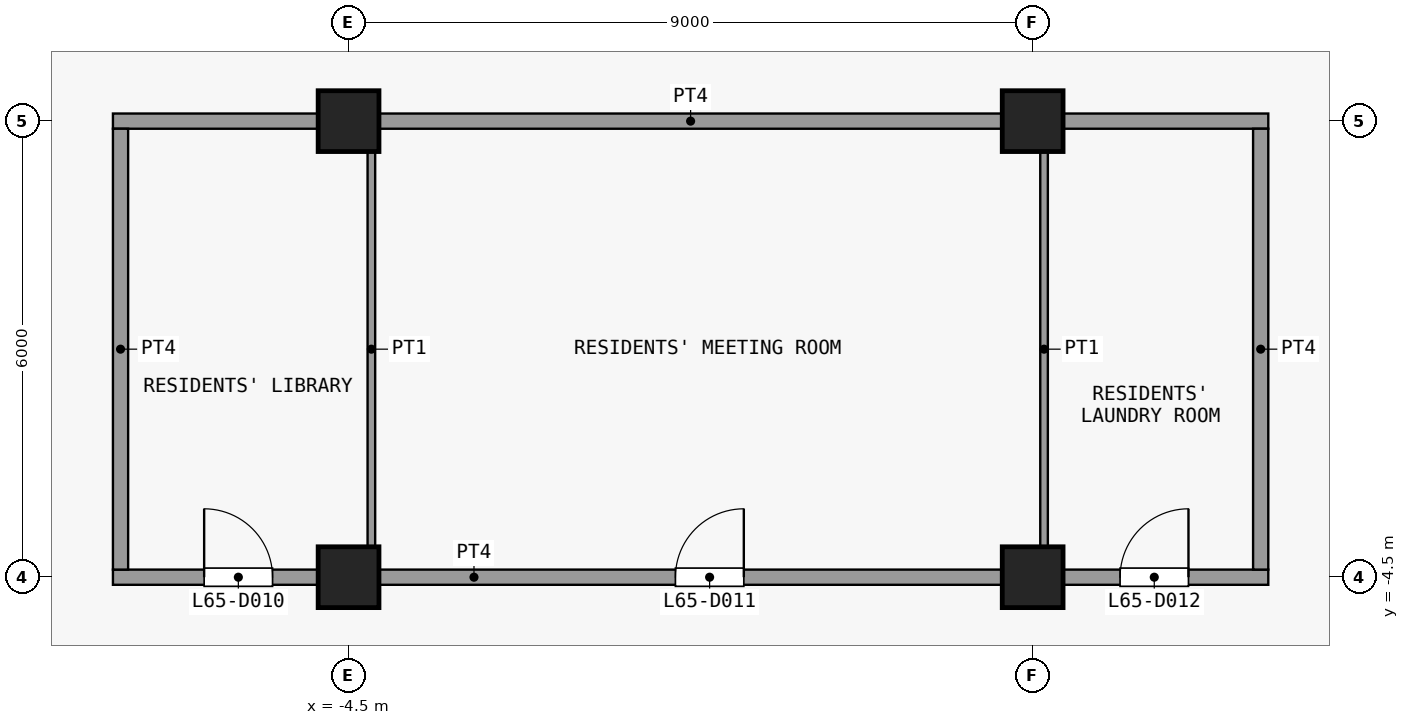
"""IFC4 building model, lengths in metres.
Left out: names, types, materials, properties, quantities, classifications, styles, units other than length and angle.
Written with IfcOpenShell. Run it as: python <this file> out.ifc"""

import sys

from ifc_helpers import new_model, si_unit, direction, frame, frame_2d, origin, origin_2d, place, context, subcontext, project, spatial, rectangle, extrude, element, fill, save


model = new_model("IFC4")
c1 = context("Model", 3, precision=1e-05, world=origin(), true_north=direction((0.0, 1.0)))
c2 = subcontext(c1, "Body", "Model", "MODEL_VIEW")
j1 = project(units=[si_unit("LENGTHUNIT", "METRE"), si_unit("PLANEANGLEUNIT", "RADIAN")], contexts=[c1])
p1 = place(None, origin())
s1 = spatial("IfcSite", under=j1, at=p1, CompositionType="ELEMENT")
p2 = place(p1, origin())
s2 = spatial("IfcBuilding", under=s1, at=p2, CompositionType="ELEMENT")
p3 = place(p2, frame((0.0, 0.0, 259.1)))
s3 = spatial("IfcBuildingStorey", under=s2, at=p3, CompositionType="ELEMENT", Elevation=259.1)
for number, where, z_axis, x_axis in (
    (1, (-4.5, -4.5, 0.0), (0.0, 0.0, 1.0), (1.0, 0.0, 0.0)),
    (2, (-4.5, 1.5, 0.0), (0.0, 0.0, 1.0), (1.0, 0.0, 0.0)),
    (3, (4.5, -4.5, 0.0), (0.0, 0.0, 1.0), (1.0, 0.0, 0.0)),
    (4, (4.5, 1.5, 0.0), (0.0, 0.0, 1.0), (1.0, 0.0, 0.0)),
):
    element("IfcColumn", number, at=place(p3, frame(where, z_axis=z_axis, x_axis=x_axis)), inside=s3, PredefinedType="COLUMN", context=c2, shape_type="SweptSolid", body=[
        extrude(rectangle(XDim=0.8, YDim=0.8, at=origin_2d()), origin(), (0.0, 0.0, 1.0), 3.6),
    ])
p4 = place(p3, frame((-7.6, -4.5, 0.0), z_axis=(0.0, 0.0, 1.0), x_axis=(1.0, 0.0, 0.0)))
e5 = element("IfcWall", 5, at=p4, inside=s3, PredefinedType="PARTITIONING", context=c2, shape_type="SweptSolid", body=[
    extrude(rectangle(XDim=15.2, YDim=0.2, at=frame_2d((7.6, 0.0))), origin(), (0.0, 0.0, 1.0), 3.3),
])
p5 = place(p4, frame((1.2, 0.0, 0.0)))
e6 = element("IfcOpeningElement", 6, at=p5, cuts=e5, PredefinedType="OPENING", context=c2, shape_type="SweptSolid", body=[
    extrude(rectangle(XDim=0.9, YDim=2.1, at=frame_2d((0.45, 1.05))), frame((0.0, 0.11, 0.0), z_axis=(0.0, -1.0, 0.0), x_axis=(1.0, 0.0, 0.0)), (0.0, 0.0, 1.0), 0.22),
])
p6 = place(p4, frame((7.4, 0.0, 0.0)))
e7 = element("IfcOpeningElement", 7, at=p6, cuts=e5, PredefinedType="OPENING", context=c2, shape_type="SweptSolid", body=[
    extrude(rectangle(XDim=0.9, YDim=2.1, at=frame_2d((0.45, 1.05))), frame((0.0, 0.11, 0.0), z_axis=(0.0, -1.0, 0.0), x_axis=(1.0, 0.0, 0.0)), (0.0, 0.0, 1.0), 0.22),
])
p7 = place(p4, frame((13.25, 0.0, 0.0)))
e8 = element("IfcOpeningElement", 8, at=p7, cuts=e5, PredefinedType="OPENING", context=c2, shape_type="SweptSolid", body=[
    extrude(rectangle(XDim=0.9, YDim=2.1, at=frame_2d((0.45, 1.05))), frame((0.0, 0.11, 0.0), z_axis=(0.0, -1.0, 0.0), x_axis=(1.0, 0.0, 0.0)), (0.0, 0.0, 1.0), 0.22),
])
p8 = place(p3, frame((-7.6, 1.5, 0.0), z_axis=(0.0, 0.0, 1.0), x_axis=(1.0, 0.0, 0.0)))
e9 = element("IfcWall", 9, at=p8, inside=s3, PredefinedType="PARTITIONING", context=c2, shape_type="SweptSolid", body=[
    extrude(rectangle(XDim=15.2, YDim=0.2, at=frame_2d((7.6, 0.0))), origin(), (0.0, 0.0, 1.0), 3.3),
])
p9 = place(p3, frame((-7.5, -4.4, 0.0), z_axis=(0.0, 0.0, 1.0), x_axis=(0.0, 1.0, 0.0)))
e10 = element("IfcWall", 10, at=p9, inside=s3, PredefinedType="PARTITIONING", context=c2, shape_type="SweptSolid", body=[
    extrude(rectangle(XDim=5.8, YDim=0.2, at=frame_2d((2.9, 0.0))), origin(), (0.0, 0.0, 1.0), 3.3),
])
for number, where, z_axis, x_axis in (
    (11, (-4.2, -4.4, 0.0), (0.0, 0.0, 1.0), (0.0, 1.0, 0.0)),
    (12, (4.65, -4.4, 0.0), (0.0, 0.0, 1.0), (0.0, 1.0, 0.0)),
):
    element("IfcWall", number, at=place(p3, frame(where, z_axis=z_axis, x_axis=x_axis)), inside=s3, PredefinedType="PARTITIONING", context=c2, shape_type="SweptSolid", body=[
        extrude(rectangle(XDim=5.8, YDim=0.1, at=frame_2d((2.9, 0.0))), origin(), (0.0, 0.0, 1.0), 3.3),
    ])
p10 = place(p3, frame((7.5, -4.4, 0.0), z_axis=(0.0, 0.0, 1.0), x_axis=(0.0, 1.0, 0.0)))
e13 = element("IfcWall", 13, at=p10, inside=s3, PredefinedType="PARTITIONING", context=c2, shape_type="SweptSolid", body=[
    extrude(rectangle(XDim=5.8, YDim=0.2, at=frame_2d((2.9, 0.0))), origin(), (0.0, 0.0, 1.0), 3.3),
])
p11 = place(p5, origin())
e14 = element("IfcDoor", 14, at=p11, inside=s3, OperationType="SINGLE_SWING_RIGHT", PredefinedType="DOOR", context=c2, shape_type="SweptSolid", body=[
    extrude(rectangle(XDim=0.9, YDim=2.1, at=frame_2d((0.45, 1.05))), frame((0.0, 0.025, 0.0), z_axis=(0.0, -1.0, 0.0), x_axis=(1.0, 0.0, 0.0)), (0.0, 0.0, 1.0), 0.05),
])
fill(e6, e14)
p12 = place(p6, origin())
e15 = element("IfcDoor", 15, at=p12, inside=s3, OperationType="SINGLE_SWING_LEFT", PredefinedType="DOOR", context=c2, shape_type="SweptSolid", body=[
    extrude(rectangle(XDim=0.9, YDim=2.1, at=frame_2d((0.45, 1.05))), frame((0.0, 0.025, 0.0), z_axis=(0.0, -1.0, 0.0), x_axis=(1.0, 0.0, 0.0)), (0.0, 0.0, 1.0), 0.05),
])
fill(e7, e15)
p13 = place(p7, origin())
e16 = element("IfcDoor", 16, at=p13, inside=s3, OperationType="SINGLE_SWING_LEFT", PredefinedType="DOOR", context=c2, shape_type="SweptSolid", body=[
    extrude(rectangle(XDim=0.9, YDim=2.1, at=frame_2d((0.45, 1.05))), frame((0.0, 0.025, 0.0), z_axis=(0.0, -1.0, 0.0), x_axis=(1.0, 0.0, 0.0)), (0.0, 0.0, 1.0), 0.05),
])
fill(e8, e16)
save(model, sys.argv[1])
